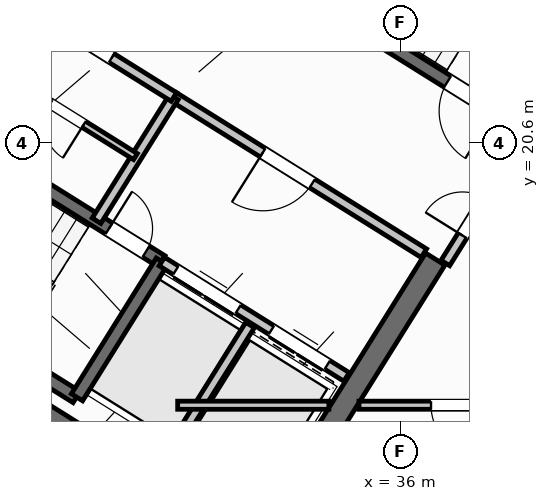
"""IFC4 building model, lengths in metres.
Left out: names, types, materials, properties, quantities, classifications, styles, units other than length and angle.
Written with IfcOpenShell. Run it as: python <this file> out.ifc"""

import sys

from ifc_helpers import new_model, si_unit, direction, frame, frame_2d, origin, place, context, subcontext, project, spatial, rectangle, extrude, source, transform, mapped, element, fill, save


model = new_model("IFC4")
c1 = context("Model", 3, precision=1e-05, world=origin(), true_north=direction((0.0, 1.0)))
c2 = subcontext(c1, "Body", "Model", "MODEL_VIEW")
j1 = project(units=[si_unit("LENGTHUNIT", "METRE"), si_unit("PLANEANGLEUNIT", "RADIAN")], contexts=[c1])
p1 = place(None, origin())
s1 = spatial("IfcSite", under=j1, at=p1, CompositionType="ELEMENT")
p2 = place(p1, origin())
s2 = spatial("IfcBuilding", under=s1, at=p2, CompositionType="ELEMENT")
p3 = place(p2, frame((0.0, 0.0, 284.4)))
s3 = spatial("IfcBuildingStorey", under=s2, at=p3, CompositionType="ELEMENT", Elevation=284.4)
p4 = place(p3, frame((33.324, 12.503, 0.0), z_axis=(0.0, 0.0, 1.0), x_axis=(-0.848043529849, 0.529926571782, 0.0)))
e1 = element("IfcWall", 1, at=p4, inside=s3, PredefinedType="SHEAR", context=c2, shape_type="SweptSolid", body=[
    extrude(rectangle(XDim=13.04, YDim=0.45, at=frame_2d((6.52, 0.0))), origin(), (0.0, 0.0, 1.0), 3.35),
])
p5 = place(p3, frame((36.683, 18.304, 0.0), z_axis=(0.0, 0.0, 1.0), x_axis=(-0.529904039071, -0.848057609704, 0.0)))
e2 = element("IfcWall", 2, at=p5, inside=s3, PredefinedType="SHEAR", context=c2, shape_type="SweptSolid", body=[
    extrude(rectangle(XDim=6.475, YDim=0.45, at=frame_2d((3.238, 0.0))), origin(), (0.0, 0.0, 1.0), 3.35),
])
p6 = place(p3, frame((29.268, 6.429, 0.0), z_axis=(0.0, 0.0, 1.0), x_axis=(-0.848048398186, 0.529918780885, 0.0)))
e3 = element("IfcWall", 3, at=p6, inside=s3, PredefinedType="STANDARD", context=c2, shape_type="SweptSolid", body=[
    extrude(rectangle(XDim=25.188, YDim=0.32, at=frame_2d((12.594, 0.0))), origin(), (0.0, 0.0, 1.0), 3.35),
])
p7 = place(p6, frame((16.362, 0.0, 0.0)))
e4 = element("IfcOpeningElement", 4, at=p7, cuts=e3, PredefinedType="OPENING", context=c2, shape_type="SweptSolid", body=[
    extrude(rectangle(XDim=1.2, YDim=2.15, at=frame_2d((0.6, 1.075))), frame((0.0, 0.17, 0.0), z_axis=(0.0, -1.0, 0.0), x_axis=(1.0, 0.0, 0.0)), (0.0, 0.0, 1.0), 0.34),
])
p8 = place(p6, frame((3.859, 0.0, 0.9)))
e5 = element("IfcOpeningElement", 5, at=p8, cuts=e3, PredefinedType="OPENING", context=c2, shape_type="SweptSolid", body=[
    extrude(rectangle(XDim=1.65, YDim=1.45, at=frame_2d((0.825, 0.725))), frame((0.0, 0.17, 0.0), z_axis=(0.0, -1.0, 0.0), x_axis=(1.0, 0.0, 0.0)), (0.0, 0.0, 1.0), 0.34),
])
p9 = place(p6, frame((10.519, 0.0, 0.9)))
e6 = element("IfcOpeningElement", 6, at=p9, cuts=e3, PredefinedType="OPENING", context=c2, shape_type="SweptSolid", body=[
    extrude(rectangle(XDim=1.65, YDim=1.45, at=frame_2d((0.825, 0.725))), frame((0.0, 0.17, 0.0), z_axis=(0.0, -1.0, 0.0), x_axis=(1.0, 0.0, 0.0)), (0.0, 0.0, 1.0), 0.34),
])
p10 = place(p6, frame((19.841, 0.0, 0.95)))
e7 = element("IfcOpeningElement", 7, at=p10, cuts=e3, PredefinedType="OPENING", context=c2, shape_type="SweptSolid", body=[
    extrude(rectangle(XDim=1.95, YDim=1.35, at=frame_2d((0.975, 0.675))), frame((0.0, 0.17, 0.0), z_axis=(0.0, -1.0, 0.0), x_axis=(1.0, 0.0, 0.0)), (0.0, 0.0, 1.0), 0.34),
])
p11 = place(p6, frame((23.478, 0.0, 1.0)))
e8 = element("IfcOpeningElement", 8, at=p11, cuts=e3, PredefinedType="OPENING", context=c2, shape_type="SweptSolid", body=[
    extrude(rectangle(XDim=0.9, YDim=1.25, at=frame_2d((0.45, 0.625))), frame((0.0, 0.17, 0.0), z_axis=(0.0, -1.0, 0.0), x_axis=(1.0, 0.0, 0.0)), (0.0, 0.0, 1.0), 0.34),
])
p12 = place(p3, frame((29.605, 15.581, 0.0), z_axis=(0.0, 0.0, 1.0), x_axis=(-0.848036911448, 0.529937163087, 0.0)))
e9 = element("IfcWall", 9, at=p12, inside=s3, PredefinedType="SHEAR", context=c2, shape_type="SweptSolid", body=[
    extrude(rectangle(XDim=7.46, YDim=0.26, at=frame_2d((3.73, 0.0))), origin(), (0.0, 0.0, 1.0), 3.35),
])
p13 = place(p3, frame((31.28, 18.261, 0.0), z_axis=(0.0, 0.0, 1.0), x_axis=(-0.848051618787, 0.529913626805, 0.0)))
e10 = element("IfcWall", 10, at=p13, inside=s3, PredefinedType="SHEAR", context=c2, shape_type="SweptSolid", body=[
    extrude(rectangle(XDim=7.46, YDim=0.26, at=frame_2d((3.73, 0.0))), origin(), (0.0, 0.0, 1.0), 3.35),
])
p14 = place(p13, frame((0.36, 0.0, 0.0)))
e11 = element("IfcOpeningElement", 11, at=p14, cuts=e10, PredefinedType="OPENING", context=c2, shape_type="SweptSolid", body=[
    extrude(rectangle(XDim=0.86, YDim=2.05, at=frame_2d((0.43, 1.025))), frame((0.0, 0.14, 0.0), z_axis=(0.0, -1.0, 0.0), x_axis=(1.0, 0.0, 0.0)), (0.0, 0.0, 1.0), 0.28),
])
p15 = place(p3, frame((31.288, 18.256, 0.0), z_axis=(0.0, 0.0, 1.0), x_axis=(-0.529943379326, -0.848033026897, 0.0)))
e12 = element("IfcWall", 12, at=p15, inside=s3, PredefinedType="SHEAR", context=c2, shape_type="SweptSolid", body=[
    extrude(rectangle(XDim=3.16, YDim=0.26, at=frame_2d((1.58, 0.0))), origin(), (0.0, 0.0, 1.0), 3.35),
])
p16 = place(p3, frame((38.046, 21.108, 0.0), z_axis=(0.0, 0.0, 1.0), x_axis=(-0.848054434086, 0.529909121291, 0.0)))
e13 = element("IfcWall", 13, at=p16, inside=s3, PredefinedType="SHEAR", context=c2, shape_type="SweptSolid", body=[
    extrude(rectangle(XDim=7.33, YDim=0.26, at=frame_2d((3.665, 0.0))), origin(), (0.0, 0.0, 1.0), 3.35),
])
p17 = place(p16, frame((0.22, 0.0, 0.0)))
e14 = element("IfcOpeningElement", 14, at=p17, cuts=e13, PredefinedType="OPENING", context=c2, shape_type="SweptSolid", body=[
    extrude(rectangle(XDim=1.1, YDim=2.1, at=frame_2d((0.55, 1.05))), frame((0.0, 0.14, 0.0), z_axis=(0.0, -1.0, 0.0), x_axis=(1.0, 0.0, 0.0)), (0.0, 0.0, 1.0), 0.28),
])
p18 = place(p3, frame((34.933, 15.978, 0.0), z_axis=(0.0, 0.0, 1.0), x_axis=(-0.848055739377, 0.529907032327, 0.0)))
e15 = element("IfcWall", 15, at=p18, inside=s3, PredefinedType="STANDARD", context=c2, shape_type="SweptSolid", body=[
    extrude(rectangle(XDim=4.298, YDim=0.2, at=frame_2d((2.149, 0.0))), origin(), (0.0, 0.0, 1.0), 3.34),
])
p19 = place(p18, frame((0.448, 0.0, 0.0)))
e16 = element("IfcOpeningElement", 16, at=p19, cuts=e15, PredefinedType="OPENING", context=c2, shape_type="SweptSolid", body=[
    extrude(rectangle(XDim=1.3, YDim=2.2, at=frame_2d((0.65, 1.1))), frame((0.0, 0.11, 0.0), z_axis=(0.0, -1.0, 0.0), x_axis=(1.0, 0.0, 0.0)), (0.0, 0.0, 1.0), 0.22),
])
p20 = place(p18, frame((2.523, 0.0, 0.0)))
e17 = element("IfcOpeningElement", 17, at=p20, cuts=e15, PredefinedType="OPENING", context=c2, shape_type="SweptSolid", body=[
    extrude(rectangle(XDim=1.45, YDim=2.25, at=frame_2d((0.725, 1.125))), frame((0.0, 0.11, 0.0), z_axis=(0.0, -1.0, 0.0), x_axis=(1.0, 0.0, 0.0)), (0.0, 0.0, 1.0), 0.22),
])
p21 = place(p3, frame((36.459, 18.421, 0.0), z_axis=(0.0, 0.0, 1.0), x_axis=(-0.848059591691, 0.529900867089, 0.0)))
e18 = element("IfcWall", 18, at=p21, inside=s3, PredefinedType="STANDARD", context=c2, shape_type="SweptSolid", body=[
    extrude(rectangle(XDim=5.818, YDim=0.2, at=frame_2d((2.909, 0.0))), origin(), (0.0, 0.0, 1.0), 3.34),
])
p22 = place(p21, frame((2.598, 0.0, 0.0)))
e19 = element("IfcOpeningElement", 19, at=p22, cuts=e18, PredefinedType="OPENING", context=c2, shape_type="SweptSolid", body=[
    extrude(rectangle(XDim=1.15, YDim=2.1, at=frame_2d((0.575, 1.05))), frame((0.0, 0.11, 0.0), z_axis=(0.0, -1.0, 0.0), x_axis=(1.0, 0.0, 0.0)), (0.0, 0.0, 1.0), 0.22),
])
p23 = place(p3, frame((33.029, 17.003, 0.0), z_axis=(0.0, 0.0, 1.0), x_axis=(-0.529916267533, -0.848049968695, 0.0)))
e20 = element("IfcWall", 20, at=p23, inside=s3, PredefinedType="STANDARD", context=c2, shape_type="SweptSolid", body=[
    extrude(rectangle(XDim=2.92, YDim=0.2, at=frame_2d((1.46, 0.0))), origin(), (0.0, 0.0, 1.0), 3.34),
])
p24 = place(p3, frame((31.525, 21.504, 0.0), z_axis=(0.0, 0.0, 1.0), x_axis=(-0.529907497854, -0.848055448493, 0.0)))
e21 = element("IfcWall", 21, at=p24, inside=s3, PredefinedType="STANDARD", context=c2, shape_type="SweptSolid", body=[
    extrude(rectangle(XDim=2.88, YDim=0.2, at=frame_2d((1.44, 0.0))), origin(), (0.0, 0.0, 1.0), 3.34),
])
p25 = place(p3, frame((31.525, 21.504, 0.0), z_axis=(0.0, 0.0, 1.0), x_axis=(-0.848042066329, 0.529928913853, 0.0)))
e22 = element("IfcWall", 22, at=p25, inside=s3, PredefinedType="STANDARD", context=c2, shape_type="SweptSolid", body=[
    extrude(rectangle(XDim=6.268, YDim=0.2, at=frame_2d((3.134, 0.0))), origin(), (0.0, 0.0, 1.0), 3.34),
])
p26 = place(p25, frame((4.4, 0.0, 0.0)))
e23 = element("IfcOpeningElement", 23, at=p26, cuts=e22, PredefinedType="OPENING", context=c2, shape_type="SweptSolid", body=[
    extrude(rectangle(XDim=0.86, YDim=2.05, at=frame_2d((0.43, 1.025))), frame((0.0, 0.11, 0.0), z_axis=(0.0, -1.0, 0.0), x_axis=(1.0, 0.0, 0.0)), (0.0, 0.0, 1.0), 0.22),
])
p27 = place(p25, frame((1.45, 0.0, 0.0)))
e24 = element("IfcOpeningElement", 24, at=p27, cuts=e22, PredefinedType="OPENING", context=c2, shape_type="SweptSolid", body=[
    extrude(rectangle(XDim=0.86, YDim=2.05, at=frame_2d((0.43, 1.025))), frame((0.0, 0.11, 0.0), z_axis=(0.0, -1.0, 0.0), x_axis=(1.0, 0.0, 0.0)), (0.0, 0.0, 1.0), 0.22),
])
p28 = place(p3, frame((30.766, 20.327, 0.0), z_axis=(0.0, 0.0, 1.0), x_axis=(-0.848052663127, 0.529911955482, 0.0)))
e25 = element("IfcWall", 25, at=p28, inside=s3, PredefinedType="PLUMBINGWALL", context=c2, shape_type="SweptSolid", body=[
    extrude(rectangle(XDim=3.28, YDim=0.14, at=frame_2d((1.64, 0.0))), origin(), (0.0, 0.0, 1.0), 3.34),
])
p29 = place(p28, frame((1.2, 0.0, 0.0)))
e26 = element("IfcOpeningElement", 26, at=p29, cuts=e25, PredefinedType="OPENING", context=c2, shape_type="SweptSolid", body=[
    extrude(rectangle(XDim=0.78, YDim=2.05, at=frame_2d((0.39, 1.025))), frame((0.0, 0.08, 0.0), z_axis=(0.0, -1.0, 0.0), x_axis=(1.0, 0.0, 0.0)), (0.0, 0.0, 1.0), 0.16),
])
p30 = place(p3, frame((32.164, 10.374, 0.0), z_axis=(0.0, 0.0, 1.0), x_axis=(-0.848044107957, 0.529925646633, 0.0)))
e27 = element("IfcWall", 27, at=p30, inside=s3, PredefinedType="PARTITIONING", context=c2, shape_type="SweptSolid", body=[
    extrude(rectangle(XDim=15.57, YDim=0.16, at=frame_2d((7.785, 0.0))), origin(), (0.0, 0.0, 1.0), 3.34),
])
p31 = place(p30, frame((10.83, 0.0, 0.0)))
e28 = element("IfcOpeningElement", 28, at=p31, cuts=e27, PredefinedType="OPENING", context=c2, shape_type="SweptSolid", body=[
    extrude(rectangle(XDim=1.0, YDim=2.1, at=frame_2d((0.5, 1.05))), frame((0.0, 0.09, 0.0), z_axis=(0.0, -1.0, 0.0), x_axis=(1.0, 0.0, 0.0)), (0.0, 0.0, 1.0), 0.18),
])
p32 = place(p3, frame((29.72, 8.859, 0.0), z_axis=(0.0, 0.0, 1.0), x_axis=(-0.848049134363, 0.529917602752, 0.0)))
e29 = element("IfcWall", 29, at=p32, inside=s3, PredefinedType="PLUMBINGWALL", context=c2, shape_type="SweptSolid", body=[
    extrude(rectangle(XDim=14.3, YDim=0.14, at=frame_2d((7.15, 0.0))), origin(), (0.0, 0.0, 1.0), 3.34),
])
p33 = place(p32, frame((9.57, 0.0, 0.0)))
e30 = element("IfcOpeningElement", 30, at=p33, cuts=e29, PredefinedType="OPENING", context=c2, shape_type="SweptSolid", body=[
    extrude(rectangle(XDim=0.92, YDim=2.08, at=frame_2d((0.46, 1.04))), frame((0.0, 0.08, 0.0), z_axis=(0.0, -1.0, 0.0), x_axis=(1.0, 0.0, 0.0)), (0.0, 0.0, 1.0), 0.16),
])
p34 = place(p3, frame((38.451, 20.737, 0.0), z_axis=(0.0, 0.0, 1.0), x_axis=(-0.529924799939, -0.848044637038, 0.0)))
e31 = element("IfcWall", 31, at=p34, inside=s3, PredefinedType="STANDARD", context=c2, shape_type="SweptSolid", body=[
    extrude(rectangle(XDim=2.96, YDim=0.2, at=frame_2d((1.48, 0.0))), origin(), (0.0, 0.0, 1.0), 3.34),
])
p35 = place(p34, frame((1.46, 0.0, 0.0)))
e32 = element("IfcOpeningElement", 32, at=p35, cuts=e31, PredefinedType="OPENING", context=c2, shape_type="SweptSolid", body=[
    extrude(rectangle(XDim=0.86, YDim=2.05, at=frame_2d((0.43, 1.025))), frame((0.0, 0.11, 0.0), z_axis=(0.0, -1.0, 0.0), x_axis=(1.0, 0.0, 0.0)), (0.0, 0.0, 1.0), 0.22),
])
p36 = place(p3, frame((31.6, 15.42, 0.0), z_axis=(0.0, 0.0, 1.0), x_axis=(1.0, 0.0, 0.0)))
e33 = element("IfcWall", 33, at=p36, inside=s3, PredefinedType="PARTITIONING", context=c2, shape_type="SweptSolid", body=[
    extrude(rectangle(XDim=2.984, YDim=0.16, at=frame_2d((1.492, 0.0))), origin(), (0.0, 0.0, 1.0), 3.34),
])
p37 = place(p3, frame((35.178, 15.42, 0.0), z_axis=(0.0, 0.0, 1.0), x_axis=(1.0, 0.0, 0.0)))
e34 = element("IfcWall", 34, at=p37, inside=s3, PredefinedType="PARTITIONING", context=c2, shape_type="SweptSolid", body=[
    extrude(rectangle(XDim=9.021, YDim=0.16, at=frame_2d((4.511, 0.0))), origin(), (0.0, 0.0, 1.0), 3.34),
])
p38 = place(p37, frame((1.422, 0.0, 0.0)))
e35 = element("IfcOpeningElement", 35, at=p38, cuts=e34, PredefinedType="OPENING", context=c2, shape_type="SweptSolid", body=[
    extrude(rectangle(XDim=1.0, YDim=2.1, at=frame_2d((0.5, 1.05))), frame((0.0, 0.09, 0.0), z_axis=(0.0, -1.0, 0.0), x_axis=(1.0, 0.0, 0.0)), (0.0, 0.0, 1.0), 0.18),
])
m1 = source(origin(), c2, "Body", "SweptSolid", [
    extrude(rectangle(XDim=0.86, YDim=2.05, at=frame_2d((0.43, 1.025))), frame((0.0, 0.025, 0.0), z_axis=(0.0, -1.0, 0.0), x_axis=(1.0, 0.0, 0.0)), (0.0, 0.0, 1.0), 0.05),
])
p39 = place(p14, frame((0.86, 0.0, 0.0), z_axis=(0.0, 0.0, 1.0), x_axis=(-1.0, 0.0, 0.0)))
e36 = element("IfcDoor", 36, at=p39, inside=s3, OperationType="SINGLE_SWING_LEFT", PredefinedType="DOOR", context=c2, shape_type="MappedRepresentation", body=[
    mapped(m1, transform((0.0, 0.0, 0.0), scale=1.0)),
])
fill(e11, e36)
m2 = source(origin(), c2, "Body", "SweptSolid", [
    extrude(rectangle(XDim=1.1, YDim=2.1, at=frame_2d((0.55, 1.05))), frame((0.0, 0.025, 0.0), z_axis=(0.0, -1.0, 0.0), x_axis=(1.0, 0.0, 0.0)), (0.0, 0.0, 1.0), 0.05),
])
p40 = place(p17, origin())
e37 = element("IfcDoor", 37, at=p40, inside=s3, OperationType="SINGLE_SWING_LEFT", PredefinedType="DOOR", context=c2, shape_type="MappedRepresentation", body=[
    mapped(m2, transform((0.0, 0.0, 0.0), scale=1.0)),
])
fill(e14, e37)
m3 = source(origin(), c2, "Body", "SweptSolid", [
    extrude(rectangle(XDim=1.15, YDim=2.1, at=frame_2d((0.575, 1.05))), frame((0.0, 0.025, 0.0), z_axis=(0.0, -1.0, 0.0), x_axis=(1.0, 0.0, 0.0)), (0.0, 0.0, 1.0), 0.05),
])
p41 = place(p22, origin())
e38 = element("IfcDoor", 38, at=p41, inside=s3, OperationType="SINGLE_SWING_RIGHT", PredefinedType="DOOR", context=c2, shape_type="MappedRepresentation", body=[
    mapped(m3, transform((0.0, 0.0, 0.0), scale=1.0)),
])
fill(e19, e38)
m4 = source(origin(), c2, "Body", "SweptSolid", [
    extrude(rectangle(XDim=1.3, YDim=2.2, at=frame_2d((0.65, 1.1))), frame((0.0, 0.025, 0.0), z_axis=(0.0, -1.0, 0.0), x_axis=(1.0, 0.0, 0.0)), (0.0, 0.0, 1.0), 0.05),
])
p42 = place(p19, origin())
e39 = element("IfcDoor", 39, at=p42, inside=s3, OperationType="DOUBLE_DOOR_SLIDING", PredefinedType="DOOR", context=c2, shape_type="MappedRepresentation", body=[
    mapped(m4, transform((0.0, 0.0, 0.0), scale=1.0)),
])
fill(e16, e39)
m5 = source(origin(), c2, "Body", "SweptSolid", [
    extrude(rectangle(XDim=1.45, YDim=2.25, at=frame_2d((0.725, 1.125))), frame((0.0, 0.025, 0.0), z_axis=(0.0, -1.0, 0.0), x_axis=(1.0, 0.0, 0.0)), (0.0, 0.0, 1.0), 0.05),
])
p43 = place(p20, origin())
e40 = element("IfcDoor", 40, at=p43, inside=s3, OperationType="DOUBLE_DOOR_SLIDING", PredefinedType="DOOR", context=c2, shape_type="MappedRepresentation", body=[
    mapped(m5, transform((0.0, 0.0, 0.0), scale=1.0)),
])
fill(e17, e40)
p44 = place(p27, frame((0.86, 0.0, 0.0), z_axis=(0.0, 0.0, 1.0), x_axis=(-1.0, 0.0, 0.0)))
e41 = element("IfcDoor", 41, at=p44, inside=s3, OperationType="SINGLE_SWING_RIGHT", PredefinedType="DOOR", context=c2, shape_type="MappedRepresentation", body=[
    mapped(m1, transform((0.0, 0.0, 0.0), scale=1.0)),
])
fill(e24, e41)
m6 = source(origin(), c2, "Body", "SweptSolid", [
    extrude(rectangle(XDim=0.78, YDim=2.05, at=frame_2d((0.39, 1.025))), frame((0.0, 0.025, 0.0), z_axis=(0.0, -1.0, 0.0), x_axis=(1.0, 0.0, 0.0)), (0.0, 0.0, 1.0), 0.05),
])
p45 = place(p29, origin())
e42 = element("IfcDoor", 42, at=p45, inside=s3, OperationType="SINGLE_SWING_LEFT", PredefinedType="DOOR", context=c2, shape_type="MappedRepresentation", body=[
    mapped(m6, transform((0.0, 0.0, 0.0), scale=1.0)),
])
fill(e26, e42)
p46 = place(p35, frame((0.86, 0.0, 0.0), z_axis=(0.0, 0.0, 1.0), x_axis=(-1.0, 0.0, 0.0)))
e43 = element("IfcDoor", 43, at=p46, inside=s3, OperationType="SINGLE_SWING_LEFT", PredefinedType="DOOR", context=c2, shape_type="MappedRepresentation", body=[
    mapped(m1, transform((0.0, 0.0, 0.0), scale=1.0)),
])
fill(e32, e43)
m7 = source(origin(), c2, "Body", "SweptSolid", [
    extrude(rectangle(XDim=1.0, YDim=2.1, at=frame_2d((0.5, 1.05))), frame((0.0, 0.025, 0.0), z_axis=(0.0, -1.0, 0.0), x_axis=(1.0, 0.0, 0.0)), (0.0, 0.0, 1.0), 0.05),
])
p47 = place(p38, frame((1.0, 0.0, 0.0), z_axis=(0.0, 0.0, 1.0), x_axis=(-1.0, 0.0, 0.0)))
e44 = element("IfcDoor", 44, at=p47, inside=s3, OperationType="SINGLE_SWING_LEFT", PredefinedType="DOOR", context=c2, shape_type="MappedRepresentation", body=[
    mapped(m7, transform((0.0, 0.0, 0.0), scale=1.0)),
])
fill(e35, e44)
save(model, sys.argv[1])
